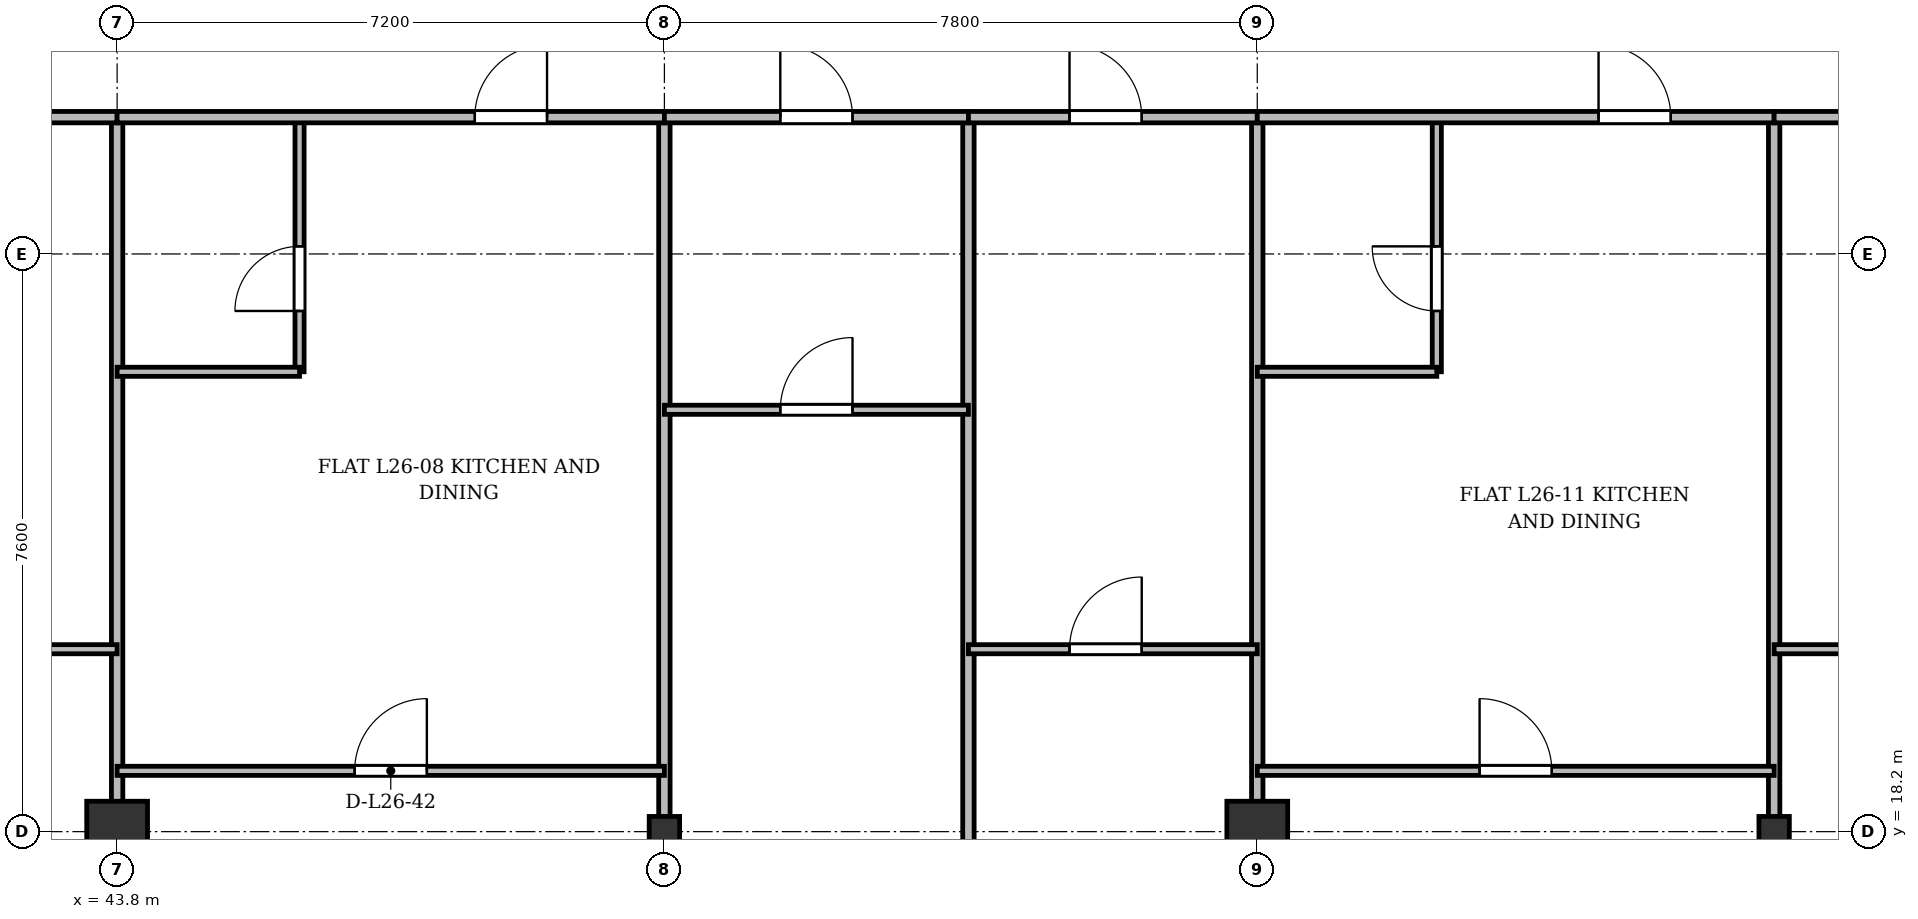
"""IFC4 building model, lengths in metres.
Left out: names, types, materials, properties, quantities, classifications, styles, units other than length and angle.
Written with IfcOpenShell. Run it as: python <this file> out.ifc"""

import sys

from ifc_helpers import new_model, si_unit, direction, frame, frame_2d, origin, origin_2d, place, context, subcontext, project, spatial, rectangle, i_section, extrude, source, transform, mapped, element, fill, save


model = new_model("IFC4")
c1 = context("Model", 3, precision=1e-05, world=origin(), true_north=direction((0.0, 1.0)))
c2 = subcontext(c1, "Body", "Model", "MODEL_VIEW")
j1 = project(units=[si_unit("LENGTHUNIT", "METRE"), si_unit("PLANEANGLEUNIT", "RADIAN")], contexts=[c1])
p1 = place(None, origin())
s1 = spatial("IfcSite", under=j1, at=p1, CompositionType="ELEMENT")
p2 = place(p1, origin())
s2 = spatial("IfcBuilding", under=s1, at=p2, CompositionType="ELEMENT")
p3 = place(p2, frame((0.0, 0.0, 103.3)))
s3 = spatial("IfcBuildingStorey", under=s2, at=p3, CompositionType="ELEMENT", Elevation=103.3)
m1 = source(origin(), c2, "Body", "SweptSolid", [
    extrude(rectangle(XDim=0.8, YDim=0.8, at=origin_2d()), origin(), (0.0, 0.0, 1.0), 3.6),
])
p4 = place(p3, frame((43.8, 18.2, 0.0), z_axis=(0.0, 0.0, 1.0), x_axis=(1.0, 0.0, 0.0)))
e1 = element("IfcColumn", 1, at=p4, inside=s3, PredefinedType="COLUMN", context=c2, shape_type="MappedRepresentation", body=[
    mapped(m1, transform((0.0, 0.0, 0.0), x_axis=(1.0, 0.0, 0.0), y_axis=(0.0, 1.0, 0.0), z_axis=(0.0, 0.0, 1.0), scale=1.0)),
])
m2 = source(origin(), c2, "Body", "SweptSolid", [
    extrude(i_section(OverallWidth=0.4, OverallDepth=0.4, WebThickness=0.022, FlangeThickness=0.035, at=origin_2d()), origin(), (0.0, 0.0, 1.0), 3.6),
])
p5 = place(p3, frame((51.0, 18.2, 0.0), z_axis=(0.0, 0.0, 1.0), x_axis=(1.0, 0.0, 0.0)))
e2 = element("IfcColumn", 2, at=p5, inside=s3, PredefinedType="COLUMN", context=c2, shape_type="MappedRepresentation", body=[
    mapped(m2, transform((0.0, 0.0, 0.0), x_axis=(1.0, 0.0, 0.0), y_axis=(0.0, 1.0, 0.0), z_axis=(0.0, 0.0, 1.0), scale=1.0)),
])
p6 = place(p3, frame((58.8, 18.2, 0.0), z_axis=(0.0, 0.0, 1.0), x_axis=(1.0, 0.0, 0.0)))
e3 = element("IfcColumn", 3, at=p6, inside=s3, PredefinedType="COLUMN", context=c2, shape_type="MappedRepresentation", body=[
    mapped(m1, transform((0.0, 0.0, 0.0), x_axis=(1.0, 0.0, 0.0), y_axis=(0.0, 1.0, 0.0), z_axis=(0.0, 0.0, 1.0), scale=1.0)),
])
p7 = place(p3, frame((65.6, 18.2, 0.0), z_axis=(0.0, 0.0, 1.0), x_axis=(1.0, 0.0, 0.0)))
e4 = element("IfcColumn", 4, at=p7, inside=s3, PredefinedType="COLUMN", context=c2, shape_type="MappedRepresentation", body=[
    mapped(m2, transform((0.0, 0.0, 0.0), x_axis=(1.0, 0.0, 0.0), y_axis=(0.0, 1.0, 0.0), z_axis=(0.0, 0.0, 1.0), scale=1.0)),
])
for number, where, z_axis, x_axis in (
    (5, (43.8, 3.145, 0.0), (0.0, 0.0, 1.0), (0.0, 1.0, 0.0)),
    (6, (51.0, 3.145, 0.0), (0.0, 0.0, 1.0), (0.0, 1.0, 0.0)),
):
    element("IfcWall", number, at=place(p3, frame(where, z_axis=z_axis, x_axis=x_axis)), inside=s3, PredefinedType="PARTITIONING", context=c2, shape_type="SweptSolid", body=[
        extrude(rectangle(XDim=24.455, YDim=0.15, at=frame_2d((12.228, 0.0))), origin(), (0.0, 0.0, 1.0), 2.84),
    ])
p8 = place(p3, frame((55.0, 3.145, 0.0), z_axis=(0.0, 0.0, 1.0), x_axis=(0.0, 1.0, 0.0)))
e7 = element("IfcWall", 7, at=p8, inside=s3, PredefinedType="PARTITIONING", context=c2, shape_type="SweptSolid", body=[
    extrude(rectangle(XDim=24.455, YDim=0.15, at=frame_2d((12.228, 0.0))), origin(), (0.0, 0.0, 1.0), 2.752),
])
for number, where, z_axis, x_axis in (
    (8, (58.8, 3.145, 0.0), (0.0, 0.0, 1.0), (0.0, 1.0, 0.0)),
    (9, (65.6, 3.145, 0.0), (0.0, 0.0, 1.0), (0.0, 1.0, 0.0)),
):
    element("IfcWall", number, at=place(p3, frame(where, z_axis=z_axis, x_axis=x_axis)), inside=s3, PredefinedType="PARTITIONING", context=c2, shape_type="SweptSolid", body=[
        extrude(rectangle(XDim=24.455, YDim=0.15, at=frame_2d((12.228, 0.0))), origin(), (0.0, 0.0, 1.0), 2.84),
    ])
p9 = place(p3, frame((37.2, 27.6, 0.0), z_axis=(0.0, 0.0, 1.0), x_axis=(1.0, 0.0, 0.0)))
e10 = element("IfcWall", 10, at=p9, inside=s3, PredefinedType="PARTITIONING", context=c2, shape_type="SweptSolid", body=[
    extrude(rectangle(XDim=6.6, YDim=0.15, at=frame_2d((3.3, 0.0))), origin(), (0.0, 0.0, 1.0), 2.84),
])
p10 = place(p9, frame((2.734, 0.0, 0.0)))
e11 = element("IfcOpeningElement", 11, at=p10, cuts=e10, PredefinedType="OPENING", context=c2, shape_type="SweptSolid", body=[
    extrude(rectangle(XDim=0.95, YDim=2.15, at=frame_2d((0.475, 1.075))), frame((0.0, 0.085, 0.0), z_axis=(0.0, -1.0, 0.0), x_axis=(1.0, 0.0, 0.0)), (0.0, 0.0, 1.0), 0.17),
])
p11 = place(p3, frame((37.2, 20.6, 0.0), z_axis=(0.0, 0.0, 1.0), x_axis=(1.0, 0.0, 0.0)))
e12 = element("IfcWall", 12, at=p11, inside=s3, PredefinedType="PARTITIONING", context=c2, shape_type="SweptSolid", body=[
    extrude(rectangle(XDim=6.6, YDim=0.12, at=frame_2d((3.3, 0.0))), origin(), (0.0, 0.0, 1.0), 2.84),
])
p12 = place(p11, frame((2.734, 0.0, 0.0)))
e13 = element("IfcOpeningElement", 13, at=p12, cuts=e12, PredefinedType="OPENING", context=c2, shape_type="SweptSolid", body=[
    extrude(rectangle(XDim=0.95, YDim=2.15, at=frame_2d((0.475, 1.075))), frame((0.0, 0.07, 0.0), z_axis=(0.0, -1.0, 0.0), x_axis=(1.0, 0.0, 0.0)), (0.0, 0.0, 1.0), 0.14),
])
p13 = place(p3, frame((43.8, 19.0, 0.0), z_axis=(0.0, 0.0, 1.0), x_axis=(1.0, 0.0, 0.0)))
e14 = element("IfcWall", 14, at=p13, inside=s3, PredefinedType="PARTITIONING", context=c2, shape_type="SweptSolid", body=[
    extrude(rectangle(XDim=7.2, YDim=0.12, at=frame_2d((3.6, 0.0))), origin(), (0.0, 0.0, 1.0), 2.84),
])
p14 = place(p13, frame((3.125, 0.0, 0.0)))
e15 = element("IfcOpeningElement", 15, at=p14, cuts=e14, PredefinedType="OPENING", context=c2, shape_type="SweptSolid", body=[
    extrude(rectangle(XDim=0.95, YDim=2.15, at=frame_2d((0.475, 1.075))), frame((0.0, 0.07, 0.0), z_axis=(0.0, -1.0, 0.0), x_axis=(1.0, 0.0, 0.0)), (0.0, 0.0, 1.0), 0.14),
])
p15 = place(p3, frame((46.2, 24.25, 0.0), z_axis=(0.0, 0.0, 1.0), x_axis=(0.0, 1.0, 0.0)))
e16 = element("IfcWall", 16, at=p15, inside=s3, PredefinedType="PARTITIONING", context=c2, shape_type="SweptSolid", body=[
    extrude(rectangle(XDim=3.35, YDim=0.12, at=frame_2d((1.675, 0.0))), origin(), (0.0, 0.0, 1.0), 2.99),
])
p16 = place(p15, frame((0.8, 0.0, 0.0)))
e17 = element("IfcOpeningElement", 17, at=p16, cuts=e16, PredefinedType="OPENING", context=c2, shape_type="SweptSolid", body=[
    extrude(rectangle(XDim=0.85, YDim=2.1, at=frame_2d((0.425, 1.05))), frame((0.0, 0.07, 0.0), z_axis=(0.0, -1.0, 0.0), x_axis=(1.0, 0.0, 0.0)), (0.0, 0.0, 1.0), 0.14),
])
p17 = place(p3, frame((43.8, 24.25, 0.0), z_axis=(0.0, 0.0, 1.0), x_axis=(1.0, 0.0, 0.0)))
e18 = element("IfcWall", 18, at=p17, inside=s3, PredefinedType="PARTITIONING", context=c2, shape_type="SweptSolid", body=[
    extrude(rectangle(XDim=2.4, YDim=0.12, at=frame_2d((1.2, 0.0))), origin(), (0.0, 0.0, 1.0), 2.84),
])
p18 = place(p3, frame((43.8, 27.6, 0.0), z_axis=(0.0, 0.0, 1.0), x_axis=(1.0, 0.0, 0.0)))
e19 = element("IfcWall", 19, at=p18, inside=s3, PredefinedType="PARTITIONING", context=c2, shape_type="SweptSolid", body=[
    extrude(rectangle(XDim=7.2, YDim=0.15, at=frame_2d((3.6, 0.0))), origin(), (0.0, 0.0, 1.0), 2.84),
])
p19 = place(p18, frame((4.706, 0.0, 0.0)))
e20 = element("IfcOpeningElement", 20, at=p19, cuts=e19, PredefinedType="OPENING", context=c2, shape_type="SweptSolid", body=[
    extrude(rectangle(XDim=0.95, YDim=2.15, at=frame_2d((0.475, 1.075))), frame((0.0, 0.085, 0.0), z_axis=(0.0, -1.0, 0.0), x_axis=(1.0, 0.0, 0.0)), (0.0, 0.0, 1.0), 0.17),
])
p20 = place(p3, frame((51.0, 27.6, 0.0), z_axis=(0.0, 0.0, 1.0), x_axis=(1.0, 0.0, 0.0)))
e21 = element("IfcWall", 21, at=p20, inside=s3, PredefinedType="PARTITIONING", context=c2, shape_type="SweptSolid", body=[
    extrude(rectangle(XDim=4.0, YDim=0.15, at=frame_2d((2.0, 0.0))), origin(), (0.0, 0.0, 1.0), 2.84),
])
p21 = place(p20, frame((1.525, 0.0, 0.0)))
e22 = element("IfcOpeningElement", 22, at=p21, cuts=e21, PredefinedType="OPENING", context=c2, shape_type="SweptSolid", body=[
    extrude(rectangle(XDim=0.95, YDim=2.15, at=frame_2d((0.475, 1.075))), frame((0.0, 0.085, 0.0), z_axis=(0.0, -1.0, 0.0), x_axis=(1.0, 0.0, 0.0)), (0.0, 0.0, 1.0), 0.17),
])
p22 = place(p3, frame((51.0, 23.75, 0.0), z_axis=(0.0, 0.0, 1.0), x_axis=(1.0, 0.0, 0.0)))
e23 = element("IfcWall", 23, at=p22, inside=s3, PredefinedType="PARTITIONING", context=c2, shape_type="SweptSolid", body=[
    extrude(rectangle(XDim=4.0, YDim=0.12, at=frame_2d((2.0, 0.0))), origin(), (0.0, 0.0, 1.0), 2.84),
])
p23 = place(p22, frame((1.525, 0.0, 0.0)))
e24 = element("IfcOpeningElement", 24, at=p23, cuts=e23, PredefinedType="OPENING", context=c2, shape_type="SweptSolid", body=[
    extrude(rectangle(XDim=0.95, YDim=2.15, at=frame_2d((0.475, 1.075))), frame((0.0, 0.07, 0.0), z_axis=(0.0, -1.0, 0.0), x_axis=(1.0, 0.0, 0.0)), (0.0, 0.0, 1.0), 0.14),
])
p24 = place(p3, frame((55.0, 27.6, 0.0), z_axis=(0.0, 0.0, 1.0), x_axis=(1.0, 0.0, 0.0)))
e25 = element("IfcWall", 25, at=p24, inside=s3, PredefinedType="PARTITIONING", context=c2, shape_type="SweptSolid", body=[
    extrude(rectangle(XDim=3.8, YDim=0.15, at=frame_2d((1.9, 0.0))), origin(), (0.0, 0.0, 1.0), 2.84),
])
p25 = place(p24, frame((1.33, 0.0, 0.0)))
e26 = element("IfcOpeningElement", 26, at=p25, cuts=e25, PredefinedType="OPENING", context=c2, shape_type="SweptSolid", body=[
    extrude(rectangle(XDim=0.95, YDim=2.15, at=frame_2d((0.475, 1.075))), frame((0.0, 0.085, 0.0), z_axis=(0.0, -1.0, 0.0), x_axis=(1.0, 0.0, 0.0)), (0.0, 0.0, 1.0), 0.17),
])
p26 = place(p3, frame((55.0, 20.6, 0.0), z_axis=(0.0, 0.0, 1.0), x_axis=(1.0, 0.0, 0.0)))
e27 = element("IfcWall", 27, at=p26, inside=s3, PredefinedType="PARTITIONING", context=c2, shape_type="SweptSolid", body=[
    extrude(rectangle(XDim=3.8, YDim=0.12, at=frame_2d((1.9, 0.0))), origin(), (0.0, 0.0, 1.0), 2.84),
])
p27 = place(p26, frame((1.33, 0.0, 0.0)))
e28 = element("IfcOpeningElement", 28, at=p27, cuts=e27, PredefinedType="OPENING", context=c2, shape_type="SweptSolid", body=[
    extrude(rectangle(XDim=0.95, YDim=2.15, at=frame_2d((0.475, 1.075))), frame((0.0, 0.07, 0.0), z_axis=(0.0, -1.0, 0.0), x_axis=(1.0, 0.0, 0.0)), (0.0, 0.0, 1.0), 0.14),
])
p28 = place(p3, frame((58.8, 19.0, 0.0), z_axis=(0.0, 0.0, 1.0), x_axis=(1.0, 0.0, 0.0)))
e29 = element("IfcWall", 29, at=p28, inside=s3, PredefinedType="PARTITIONING", context=c2, shape_type="SweptSolid", body=[
    extrude(rectangle(XDim=6.8, YDim=0.12, at=frame_2d((3.4, 0.0))), origin(), (0.0, 0.0, 1.0), 2.84),
])
p29 = place(p28, frame((2.925, 0.0, 0.0)))
e30 = element("IfcOpeningElement", 30, at=p29, cuts=e29, PredefinedType="OPENING", context=c2, shape_type="SweptSolid", body=[
    extrude(rectangle(XDim=0.95, YDim=2.15, at=frame_2d((0.475, 1.075))), frame((0.0, 0.07, 0.0), z_axis=(0.0, -1.0, 0.0), x_axis=(1.0, 0.0, 0.0)), (0.0, 0.0, 1.0), 0.14),
])
p30 = place(p3, frame((61.162, 24.25, 0.0), z_axis=(0.0, 0.0, 1.0), x_axis=(0.0, 1.0, 0.0)))
e31 = element("IfcWall", 31, at=p30, inside=s3, PredefinedType="PARTITIONING", context=c2, shape_type="SweptSolid", body=[
    extrude(rectangle(XDim=3.35, YDim=0.12, at=frame_2d((1.675, 0.0))), origin(), (0.0, 0.0, 1.0), 2.99),
])
p31 = place(p30, frame((0.8, 0.0, 0.0)))
e32 = element("IfcOpeningElement", 32, at=p31, cuts=e31, PredefinedType="OPENING", context=c2, shape_type="SweptSolid", body=[
    extrude(rectangle(XDim=0.85, YDim=2.1, at=frame_2d((0.425, 1.05))), frame((0.0, 0.07, 0.0), z_axis=(0.0, -1.0, 0.0), x_axis=(1.0, 0.0, 0.0)), (0.0, 0.0, 1.0), 0.14),
])
p32 = place(p3, frame((58.8, 24.25, 0.0), z_axis=(0.0, 0.0, 1.0), x_axis=(1.0, 0.0, 0.0)))
e33 = element("IfcWall", 33, at=p32, inside=s3, PredefinedType="PARTITIONING", context=c2, shape_type="SweptSolid", body=[
    extrude(rectangle(XDim=2.362, YDim=0.12, at=frame_2d((1.181, 0.0))), origin(), (0.0, 0.0, 1.0), 2.84),
])
p33 = place(p3, frame((58.8, 27.6, 0.0), z_axis=(0.0, 0.0, 1.0), x_axis=(1.0, 0.0, 0.0)))
e34 = element("IfcWall", 34, at=p33, inside=s3, PredefinedType="PARTITIONING", context=c2, shape_type="SweptSolid", body=[
    extrude(rectangle(XDim=6.8, YDim=0.15, at=frame_2d((3.4, 0.0))), origin(), (0.0, 0.0, 1.0), 2.84),
])
p34 = place(p33, frame((4.49, 0.0, 0.0)))
e35 = element("IfcOpeningElement", 35, at=p34, cuts=e34, PredefinedType="OPENING", context=c2, shape_type="SweptSolid", body=[
    extrude(rectangle(XDim=0.95, YDim=2.15, at=frame_2d((0.475, 1.075))), frame((0.0, 0.085, 0.0), z_axis=(0.0, -1.0, 0.0), x_axis=(1.0, 0.0, 0.0)), (0.0, 0.0, 1.0), 0.17),
])
p35 = place(p3, frame((65.6, 27.6, 0.0), z_axis=(0.0, 0.0, 1.0), x_axis=(1.0, 0.0, 0.0)))
e36 = element("IfcWall", 36, at=p35, inside=s3, PredefinedType="PARTITIONING", context=c2, shape_type="SweptSolid", body=[
    extrude(rectangle(XDim=4.055, YDim=0.15, at=frame_2d((2.027, 0.0))), origin(), (0.0, 0.0, 1.0), 2.84),
])
p36 = place(p35, frame((1.462, 0.0, 0.0)))
e37 = element("IfcOpeningElement", 37, at=p36, cuts=e36, PredefinedType="OPENING", context=c2, shape_type="SweptSolid", body=[
    extrude(rectangle(XDim=0.95, YDim=2.15, at=frame_2d((0.475, 1.075))), frame((0.0, 0.085, 0.0), z_axis=(0.0, -1.0, 0.0), x_axis=(1.0, 0.0, 0.0)), (0.0, 0.0, 1.0), 0.17),
])
p37 = place(p3, frame((65.6, 20.6, 0.0), z_axis=(0.0, 0.0, 1.0), x_axis=(1.0, 0.0, 0.0)))
e38 = element("IfcWall", 38, at=p37, inside=s3, PredefinedType="PARTITIONING", context=c2, shape_type="SweptSolid", body=[
    extrude(rectangle(XDim=4.055, YDim=0.12, at=frame_2d((2.027, 0.0))), origin(), (0.0, 0.0, 1.0), 2.84),
])
p38 = place(p37, frame((1.462, 0.0, 0.0)))
e39 = element("IfcOpeningElement", 39, at=p38, cuts=e38, PredefinedType="OPENING", context=c2, shape_type="SweptSolid", body=[
    extrude(rectangle(XDim=0.95, YDim=2.15, at=frame_2d((0.475, 1.075))), frame((0.0, 0.07, 0.0), z_axis=(0.0, -1.0, 0.0), x_axis=(1.0, 0.0, 0.0)), (0.0, 0.0, 1.0), 0.14),
])
m3 = source(origin(), c2, "Body", "SweptSolid", [
    extrude(rectangle(XDim=0.95, YDim=2.15, at=frame_2d((0.475, 1.075))), frame((0.0, 0.025, 0.0), z_axis=(0.0, -1.0, 0.0), x_axis=(1.0, 0.0, 0.0)), (0.0, 0.0, 1.0), 0.05),
])
p39 = place(p14, origin())
e40 = element("IfcDoor", 40, at=p39, inside=s3, OperationType="SINGLE_SWING_RIGHT", PredefinedType="DOOR", context=c2, shape_type="MappedRepresentation", body=[
    mapped(m3, transform((0.0, 0.0, 0.0), x_axis=(1.0, 0.0, 0.0), y_axis=(0.0, 1.0, 0.0), z_axis=(0.0, 0.0, 1.0), scale=1.0)),
])
fill(e15, e40)
m4 = source(origin(), c2, "Body", "SweptSolid", [
    extrude(rectangle(XDim=0.85, YDim=2.1, at=frame_2d((0.425, 1.05))), frame((0.0, 0.025, 0.0), z_axis=(0.0, -1.0, 0.0), x_axis=(1.0, 0.0, 0.0)), (0.0, 0.0, 1.0), 0.05),
])
p40 = place(p16, origin())
e41 = element("IfcDoor", 41, at=p40, inside=s3, OperationType="SINGLE_SWING_LEFT", PredefinedType="DOOR", context=c2, shape_type="MappedRepresentation", body=[
    mapped(m4, transform((0.0, 0.0, 0.0), x_axis=(1.0, 0.0, 0.0), y_axis=(0.0, 1.0, 0.0), z_axis=(0.0, 0.0, 1.0), scale=1.0)),
])
fill(e17, e41)
p41 = place(p19, origin())
e42 = element("IfcDoor", 42, at=p41, inside=s3, OperationType="SINGLE_SWING_RIGHT", PredefinedType="DOOR", context=c2, shape_type="MappedRepresentation", body=[
    mapped(m3, transform((0.0, 0.0, 0.0), x_axis=(1.0, 0.0, 0.0), y_axis=(0.0, 1.0, 0.0), z_axis=(0.0, 0.0, 1.0), scale=1.0)),
])
fill(e20, e42)
p42 = place(p21, origin())
e43 = element("IfcDoor", 43, at=p42, inside=s3, OperationType="SINGLE_SWING_LEFT", PredefinedType="DOOR", context=c2, shape_type="MappedRepresentation", body=[
    mapped(m3, transform((0.0, 0.0, 0.0), x_axis=(1.0, 0.0, 0.0), y_axis=(0.0, 1.0, 0.0), z_axis=(0.0, 0.0, 1.0), scale=1.0)),
])
fill(e22, e43)
p43 = place(p23, origin())
e44 = element("IfcDoor", 44, at=p43, inside=s3, OperationType="SINGLE_SWING_RIGHT", PredefinedType="DOOR", context=c2, shape_type="MappedRepresentation", body=[
    mapped(m3, transform((0.0, 0.0, 0.0), x_axis=(1.0, 0.0, 0.0), y_axis=(0.0, 1.0, 0.0), z_axis=(0.0, 0.0, 1.0), scale=1.0)),
])
fill(e24, e44)
p44 = place(p25, origin())
e45 = element("IfcDoor", 45, at=p44, inside=s3, OperationType="SINGLE_SWING_LEFT", PredefinedType="DOOR", context=c2, shape_type="MappedRepresentation", body=[
    mapped(m3, transform((0.0, 0.0, 0.0), x_axis=(1.0, 0.0, 0.0), y_axis=(0.0, 1.0, 0.0), z_axis=(0.0, 0.0, 1.0), scale=1.0)),
])
fill(e26, e45)
p45 = place(p27, origin())
e46 = element("IfcDoor", 46, at=p45, inside=s3, OperationType="SINGLE_SWING_RIGHT", PredefinedType="DOOR", context=c2, shape_type="MappedRepresentation", body=[
    mapped(m3, transform((0.0, 0.0, 0.0), x_axis=(1.0, 0.0, 0.0), y_axis=(0.0, 1.0, 0.0), z_axis=(0.0, 0.0, 1.0), scale=1.0)),
])
fill(e28, e46)
p46 = place(p29, origin())
e47 = element("IfcDoor", 47, at=p46, inside=s3, OperationType="SINGLE_SWING_LEFT", PredefinedType="DOOR", context=c2, shape_type="MappedRepresentation", body=[
    mapped(m3, transform((0.0, 0.0, 0.0), x_axis=(1.0, 0.0, 0.0), y_axis=(0.0, 1.0, 0.0), z_axis=(0.0, 0.0, 1.0), scale=1.0)),
])
fill(e30, e47)
p47 = place(p31, origin())
e48 = element("IfcDoor", 48, at=p47, inside=s3, OperationType="SINGLE_SWING_RIGHT", PredefinedType="DOOR", context=c2, shape_type="MappedRepresentation", body=[
    mapped(m4, transform((0.0, 0.0, 0.0), x_axis=(1.0, 0.0, 0.0), y_axis=(0.0, 1.0, 0.0), z_axis=(0.0, 0.0, 1.0), scale=1.0)),
])
fill(e32, e48)
p48 = place(p34, origin())
e49 = element("IfcDoor", 49, at=p48, inside=s3, OperationType="SINGLE_SWING_LEFT", PredefinedType="DOOR", context=c2, shape_type="MappedRepresentation", body=[
    mapped(m3, transform((0.0, 0.0, 0.0), x_axis=(1.0, 0.0, 0.0), y_axis=(0.0, 1.0, 0.0), z_axis=(0.0, 0.0, 1.0), scale=1.0)),
])
fill(e35, e49)
save(model, sys.argv[1])
